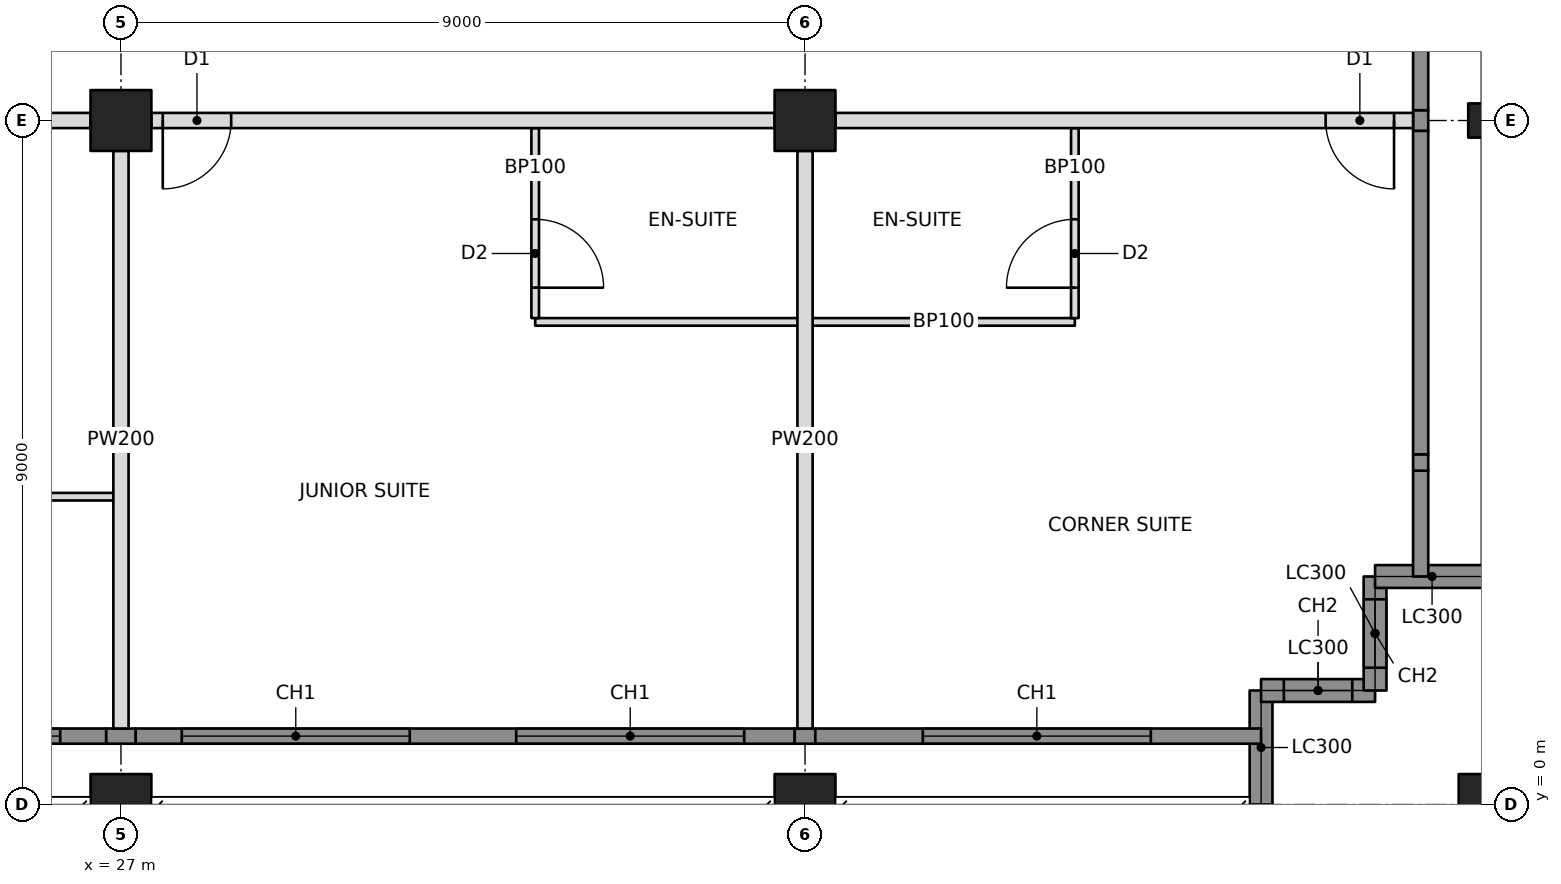
"""IFC4 building model, lengths in metres.
Left out: names, types, materials, properties, quantities, classifications, styles, units other than length and angle.
Written with IfcOpenShell. Run it as: python <this file> out.ifc"""

import sys

from ifc_helpers import new_model, si_unit, direction, frame, frame_2d, origin, origin_2d, place, context, subcontext, project, spatial, rectangle, hollow_rectangle, i_section, extrude, element, fill, save


model = new_model("IFC4")
c1 = context("Model", 3, precision=1e-05, world=origin(), true_north=direction((0.0, 1.0)))
c2 = subcontext(c1, "Body", "Model", "MODEL_VIEW")
j1 = project(units=[si_unit("LENGTHUNIT", "METRE"), si_unit("PLANEANGLEUNIT", "RADIAN")], contexts=[c1])
p1 = place(None, origin())
s1 = spatial("IfcSite", under=j1, at=p1, CompositionType="ELEMENT")
p2 = place(p1, origin())
s2 = spatial("IfcBuilding", under=s1, at=p2, CompositionType="ELEMENT")
p3 = place(p2, frame((0.0, 0.0, 187.6)))
s3 = spatial("IfcBuildingStorey", under=s2, at=p3, CompositionType="ELEMENT", Elevation=187.6)
p4 = place(p3, frame((27.0, 0.0, 0.0), z_axis=(0.0, 0.0, 1.0), x_axis=(1.0, 0.0, 0.0)))
e1 = element("IfcColumn", 1, at=p4, inside=s3, PredefinedType="COLUMN", context=c2, shape_type="SweptSolid", body=[
    extrude(hollow_rectangle(XDim=0.8, YDim=0.8, WallThickness=0.07, at=origin_2d()), origin(), (0.0, 0.0, 1.0), 3.4),
])
p5 = place(p3, frame((27.0, 9.0, 0.0), z_axis=(0.0, 0.0, 1.0), x_axis=(1.0, 0.0, 0.0)))
e2 = element("IfcColumn", 2, at=p5, inside=s3, PredefinedType="COLUMN", context=c2, shape_type="SweptSolid", body=[
    extrude(hollow_rectangle(XDim=0.8, YDim=0.8, WallThickness=0.06, at=origin_2d()), origin(), (0.0, 0.0, 1.0), 3.4),
])
p6 = place(p3, frame((36.0, 0.0, 0.0), z_axis=(0.0, 0.0, 1.0), x_axis=(1.0, 0.0, 0.0)))
e3 = element("IfcColumn", 3, at=p6, inside=s3, PredefinedType="COLUMN", context=c2, shape_type="SweptSolid", body=[
    extrude(hollow_rectangle(XDim=0.8, YDim=0.8, WallThickness=0.07, at=origin_2d()), origin(), (0.0, 0.0, 1.0), 3.4),
])
p7 = place(p3, frame((36.0, 9.0, 0.0), z_axis=(0.0, 0.0, 1.0), x_axis=(0.0, 1.0, 0.0)))
e4 = element("IfcColumn", 4, at=p7, inside=s3, PredefinedType="COLUMN", context=c2, shape_type="SweptSolid", body=[
    extrude(hollow_rectangle(XDim=0.8, YDim=0.8, WallThickness=0.06, at=origin_2d()), origin(), (0.0, 0.0, 1.0), 3.4),
])
p8 = place(p3, frame((45.0, 0.0, 0.0), z_axis=(0.0, 0.0, 1.0), x_axis=(1.0, 0.0, 0.0)))
e5 = element("IfcColumn", 5, at=p8, inside=s3, PredefinedType="COLUMN", context=c2, shape_type="SweptSolid", body=[
    extrude(hollow_rectangle(XDim=0.8, YDim=0.8, WallThickness=0.07, at=origin_2d()), origin(), (0.0, 0.0, 1.0), 3.4),
])
p9 = place(p3, frame((45.0, 9.0, 0.0), z_axis=(0.0, 0.0, 1.0), x_axis=(0.0, 1.0, 0.0)))
e6 = element("IfcColumn", 6, at=p9, inside=s3, PredefinedType="COLUMN", context=c2, shape_type="SweptSolid", body=[
    extrude(i_section(OverallWidth=0.449, OverallDepth=0.549, WebThickness=0.072, FlangeThickness=0.115, at=origin_2d()), origin(), (0.0, 0.0, 1.0), 3.4),
])
p10 = place(p3, frame((42.0, 0.0, 0.0), z_axis=(0.0, 0.0, 1.0), x_axis=(0.0, 1.0, 0.0)))
e7 = element("IfcWall", 7, at=p10, inside=s3, PredefinedType="SOLIDWALL", context=c2, shape_type="SweptSolid", body=[
    extrude(rectangle(XDim=1.5, YDim=0.3, at=frame_2d((0.75, 0.0))), origin(), (0.0, 0.0, 1.0), 2.42),
])
p11 = place(p3, frame((42.0, 1.5, 0.0), z_axis=(0.0, 0.0, 1.0), x_axis=(1.0, 0.0, 0.0)))
e8 = element("IfcWall", 8, at=p11, inside=s3, PredefinedType="SOLIDWALL", context=c2, shape_type="SweptSolid", body=[
    extrude(rectangle(XDim=1.5, YDim=0.3, at=frame_2d((0.75, 0.0))), origin(), (0.0, 0.0, 1.0), 3.2),
])
p12 = place(p11, frame((0.3, 0.0, 0.6)))
e9 = element("IfcOpeningElement", 9, at=p12, cuts=e8, PredefinedType="OPENING", context=c2, shape_type="SweptSolid", body=[
    extrude(rectangle(XDim=0.9, YDim=2.2, at=frame_2d((0.45, 1.1))), frame((0.0, 0.16, 0.0), z_axis=(0.0, -1.0, 0.0), x_axis=(1.0, 0.0, 0.0)), (0.0, 0.0, 1.0), 0.32),
])
p13 = place(p3, frame((43.5, 1.5, 0.0), z_axis=(0.0, 0.0, 1.0), x_axis=(0.0, 1.0, 0.0)))
e10 = element("IfcWall", 10, at=p13, inside=s3, PredefinedType="SOLIDWALL", context=c2, shape_type="SweptSolid", body=[
    extrude(rectangle(XDim=1.5, YDim=0.3, at=frame_2d((0.75, 0.0))), origin(), (0.0, 0.0, 1.0), 3.2),
])
p14 = place(p13, frame((0.3, 0.0, 0.6)))
e11 = element("IfcOpeningElement", 11, at=p14, cuts=e10, PredefinedType="OPENING", context=c2, shape_type="SweptSolid", body=[
    extrude(rectangle(XDim=0.9, YDim=2.2, at=frame_2d((0.45, 1.1))), frame((0.0, 0.16, 0.0), z_axis=(0.0, -1.0, 0.0), x_axis=(1.0, 0.0, 0.0)), (0.0, 0.0, 1.0), 0.32),
])
p15 = place(p3, frame((43.5, 3.0, 0.0), z_axis=(0.0, 0.0, 1.0), x_axis=(1.0, 0.0, 0.0)))
e12 = element("IfcWall", 12, at=p15, inside=s3, PredefinedType="SOLIDWALL", context=c2, shape_type="SweptSolid", body=[
    extrude(rectangle(XDim=1.5, YDim=0.3, at=frame_2d((0.75, 0.0))), origin(), (0.0, 0.0, 1.0), 2.42),
])
p16 = place(p3, frame((44.1, 3.0, 0.0), z_axis=(0.0, 0.0, 1.0), x_axis=(0.0, 1.0, 0.0)))
e13 = element("IfcWall", 13, at=p16, inside=s3, PredefinedType="SOLIDWALL", context=c2, shape_type="SweptSolid", body=[
    extrude(rectangle(XDim=1.393, YDim=0.2, at=frame_2d((0.696, 0.0))), origin(), (0.0, 0.0, 1.0), 3.2),
])
p17 = place(p3, frame((18.4, 9.0, 0.0), z_axis=(0.0, 0.0, 1.0), x_axis=(1.0, 0.0, 0.0)))
e14 = element("IfcWall", 14, at=p17, inside=s3, PredefinedType="PARTITIONING", context=c2, shape_type="SweptSolid", body=[
    extrude(rectangle(XDim=8.2, YDim=0.2, at=frame_2d((4.1, 0.0))), origin(), (0.0, 0.0, 1.0), 2.405),
])
p18 = place(p17, frame((0.15, 0.0, 0.0)))
e15 = element("IfcOpeningElement", 15, at=p18, cuts=e14, PredefinedType="OPENING", context=c2, shape_type="SweptSolid", body=[
    extrude(rectangle(XDim=0.9, YDim=2.1, at=frame_2d((0.45, 1.05))), frame((0.0, 0.11, 0.0), z_axis=(0.0, -1.0, 0.0), x_axis=(1.0, 0.0, 0.0)), (0.0, 0.0, 1.0), 0.22),
])
p19 = place(p3, frame((27.4, 9.0, 0.0), z_axis=(0.0, 0.0, 1.0), x_axis=(1.0, 0.0, 0.0)))
e16 = element("IfcWall", 16, at=p19, inside=s3, PredefinedType="PARTITIONING", context=c2, shape_type="SweptSolid", body=[
    extrude(rectangle(XDim=8.2, YDim=0.2, at=frame_2d((4.1, 0.0))), origin(), (0.0, 0.0, 1.0), 2.405),
])
p20 = place(p19, frame((0.15, 0.0, 0.0)))
e17 = element("IfcOpeningElement", 17, at=p20, cuts=e16, PredefinedType="OPENING", context=c2, shape_type="SweptSolid", body=[
    extrude(rectangle(XDim=0.9, YDim=2.1, at=frame_2d((0.45, 1.05))), frame((0.0, 0.11, 0.0), z_axis=(0.0, -1.0, 0.0), x_axis=(1.0, 0.0, 0.0)), (0.0, 0.0, 1.0), 0.22),
])
p21 = place(p3, frame((36.4, 9.0, 0.0), z_axis=(0.0, 0.0, 1.0), x_axis=(1.0, 0.0, 0.0)))
e18 = element("IfcWall", 18, at=p21, inside=s3, PredefinedType="PARTITIONING", context=c2, shape_type="SweptSolid", body=[
    extrude(rectangle(XDim=7.6, YDim=0.2, at=frame_2d((3.8, 0.0))), origin(), (0.0, 0.0, 1.0), 2.438),
])
p22 = place(p21, frame((6.45, 0.0, 0.0)))
e19 = element("IfcOpeningElement", 19, at=p22, cuts=e18, PredefinedType="OPENING", context=c2, shape_type="SweptSolid", body=[
    extrude(rectangle(XDim=0.9, YDim=2.1, at=frame_2d((0.45, 1.05))), frame((0.0, 0.11, 0.0), z_axis=(0.0, -1.0, 0.0), x_axis=(1.0, 0.0, 0.0)), (0.0, 0.0, 1.0), 0.22),
])
p23 = place(p3, frame((27.0, 8.6, 0.0), z_axis=(0.0, 0.0, 1.0), x_axis=(0.0, -1.0, 0.0)))
e20 = element("IfcWall", 20, at=p23, inside=s3, PredefinedType="PARTITIONING", context=c2, shape_type="SweptSolid", body=[
    extrude(rectangle(XDim=7.6, YDim=0.2, at=frame_2d((3.8, 0.0))), origin(), (0.0, 0.0, 1.0), 2.405),
])
p24 = place(p3, frame((36.0, 8.6, 0.0), z_axis=(0.0, 0.0, 1.0), x_axis=(0.0, -1.0, 0.0)))
e21 = element("IfcWall", 21, at=p24, inside=s3, PredefinedType="PARTITIONING", context=c2, shape_type="SweptSolid", body=[
    extrude(rectangle(XDim=7.6, YDim=0.2, at=frame_2d((3.8, 0.0))), origin(), (0.0, 0.0, 1.0), 2.438),
])
p25 = place(p3, frame((22.5, 4.05, 0.0), z_axis=(0.0, 0.0, 1.0), x_axis=(1.0, 0.0, 0.0)))
e22 = element("IfcWall", 22, at=p25, inside=s3, PredefinedType="PARTITIONING", context=c2, shape_type="SweptSolid", body=[
    extrude(rectangle(XDim=4.4, YDim=0.1, at=frame_2d((2.2, 0.0))), origin(), (0.0, 0.0, 1.0), 2.404),
])
p26 = place(p25, frame((0.5, 0.0, 0.0)))
e23 = element("IfcOpeningElement", 23, at=p26, cuts=e22, PredefinedType="OPENING", context=c2, shape_type="SweptSolid", body=[
    extrude(rectangle(XDim=0.9, YDim=2.1, at=frame_2d((0.45, 1.05))), frame((0.0, 0.06, 0.0), z_axis=(0.0, -1.0, 0.0), x_axis=(1.0, 0.0, 0.0)), (0.0, 0.0, 1.0), 0.12),
])
p27 = place(p3, frame((32.45, 6.35, 0.0), z_axis=(0.0, 0.0, 1.0), x_axis=(1.0, 0.0, 0.0)))
e24 = element("IfcWall", 24, at=p27, inside=s3, PredefinedType="PARTITIONING", context=c2, shape_type="SweptSolid", body=[
    extrude(rectangle(XDim=3.45, YDim=0.1, at=frame_2d((1.725, 0.0))), origin(), (0.0, 0.0, 1.0), 2.438),
])
p28 = place(p3, frame((32.45, 8.9, 0.0), z_axis=(0.0, 0.0, 1.0), x_axis=(0.0, -1.0, 0.0)))
e25 = element("IfcWall", 25, at=p28, inside=s3, PredefinedType="PARTITIONING", context=c2, shape_type="SweptSolid", body=[
    extrude(rectangle(XDim=2.5, YDim=0.1, at=frame_2d((1.25, 0.0))), origin(), (0.0, 0.0, 1.0), 2.404),
])
p29 = place(p28, frame((1.2, 0.0, 0.0)))
e26 = element("IfcOpeningElement", 26, at=p29, cuts=e25, PredefinedType="OPENING", context=c2, shape_type="SweptSolid", body=[
    extrude(rectangle(XDim=0.9, YDim=2.1, at=frame_2d((0.45, 1.05))), frame((0.0, 0.06, 0.0), z_axis=(0.0, -1.0, 0.0), x_axis=(1.0, 0.0, 0.0)), (0.0, 0.0, 1.0), 0.12),
])
p30 = place(p3, frame((36.1, 6.35, 0.0), z_axis=(0.0, 0.0, 1.0), x_axis=(1.0, 0.0, 0.0)))
e27 = element("IfcWall", 27, at=p30, inside=s3, PredefinedType="PARTITIONING", context=c2, shape_type="SweptSolid", body=[
    extrude(rectangle(XDim=3.45, YDim=0.1, at=frame_2d((1.725, 0.0))), origin(), (0.0, 0.0, 1.0), 2.438),
])
p31 = place(p3, frame((39.55, 8.9, 0.0), z_axis=(0.0, 0.0, 1.0), x_axis=(0.0, -1.0, 0.0)))
e28 = element("IfcWall", 28, at=p31, inside=s3, PredefinedType="PARTITIONING", context=c2, shape_type="SweptSolid", body=[
    extrude(rectangle(XDim=2.5, YDim=0.1, at=frame_2d((1.25, 0.0))), origin(), (0.0, 0.0, 1.0), 2.438),
])
p32 = place(p31, frame((1.2, 0.0, 0.0)))
e29 = element("IfcOpeningElement", 29, at=p32, cuts=e28, PredefinedType="OPENING", context=c2, shape_type="SweptSolid", body=[
    extrude(rectangle(XDim=0.9, YDim=2.1, at=frame_2d((0.45, 1.05))), frame((0.0, 0.06, 0.0), z_axis=(0.0, -1.0, 0.0), x_axis=(1.0, 0.0, 0.0)), (0.0, 0.0, 1.0), 0.12),
])
p33 = place(p3, frame((18.194, 0.9, 0.0), z_axis=(0.0, 0.0, 1.0), x_axis=(1.0, 0.0, 0.0)))
e30 = element("IfcWall", 30, at=p33, inside=s3, PredefinedType="SOLIDWALL", context=c2, shape_type="SweptSolid", body=[
    extrude(rectangle(XDim=8.612, YDim=0.2, at=frame_2d((4.306, 0.0))), origin(), (0.0, 0.0, 1.0), 3.2),
])
p34 = place(p33, frame((0.606, 0.0, 0.6)))
e31 = element("IfcOpeningElement", 31, at=p34, cuts=e30, PredefinedType="OPENING", context=c2, shape_type="SweptSolid", body=[
    extrude(rectangle(XDim=3.0, YDim=2.2, at=frame_2d((1.5, 1.1))), frame((0.0, 0.11, 0.0), z_axis=(0.0, -1.0, 0.0), x_axis=(1.0, 0.0, 0.0)), (0.0, 0.0, 1.0), 0.22),
])
p35 = place(p33, frame((5.006, 0.0, 0.6)))
e32 = element("IfcOpeningElement", 32, at=p35, cuts=e30, PredefinedType="OPENING", context=c2, shape_type="SweptSolid", body=[
    extrude(rectangle(XDim=3.0, YDim=2.2, at=frame_2d((1.5, 1.1))), frame((0.0, 0.11, 0.0), z_axis=(0.0, -1.0, 0.0), x_axis=(1.0, 0.0, 0.0)), (0.0, 0.0, 1.0), 0.22),
])
p36 = place(p3, frame((26.806, 0.9, 0.0), z_axis=(0.0, 0.0, 1.0), x_axis=(1.0, 0.0, 0.0)))
e33 = element("IfcWall", 33, at=p36, inside=s3, PredefinedType="SOLIDWALL", context=c2, shape_type="SweptSolid", body=[
    extrude(rectangle(XDim=0.388, YDim=0.2, at=frame_2d((0.194, 0.0))), origin(), (0.0, 0.0, 1.0), 2.404),
])
p37 = place(p3, frame((27.194, 0.9, 0.0), z_axis=(0.0, 0.0, 1.0), x_axis=(1.0, 0.0, 0.0)))
e34 = element("IfcWall", 34, at=p37, inside=s3, PredefinedType="SOLIDWALL", context=c2, shape_type="SweptSolid", body=[
    extrude(rectangle(XDim=8.671, YDim=0.2, at=frame_2d((4.335, 0.0))), origin(), (0.0, 0.0, 1.0), 3.2),
])
p38 = place(p37, frame((0.606, 0.0, 0.6)))
e35 = element("IfcOpeningElement", 35, at=p38, cuts=e34, PredefinedType="OPENING", context=c2, shape_type="SweptSolid", body=[
    extrude(rectangle(XDim=3.0, YDim=2.2, at=frame_2d((1.5, 1.1))), frame((0.0, 0.11, 0.0), z_axis=(0.0, -1.0, 0.0), x_axis=(1.0, 0.0, 0.0)), (0.0, 0.0, 1.0), 0.22),
])
p39 = place(p37, frame((5.006, 0.0, 0.6)))
e36 = element("IfcOpeningElement", 36, at=p39, cuts=e34, PredefinedType="OPENING", context=c2, shape_type="SweptSolid", body=[
    extrude(rectangle(XDim=3.0, YDim=2.2, at=frame_2d((1.5, 1.1))), frame((0.0, 0.11, 0.0), z_axis=(0.0, -1.0, 0.0), x_axis=(1.0, 0.0, 0.0)), (0.0, 0.0, 1.0), 0.22),
])
p40 = place(p3, frame((35.865, 0.9, 0.0), z_axis=(0.0, 0.0, 1.0), x_axis=(1.0, 0.0, 0.0)))
e37 = element("IfcWall", 37, at=p40, inside=s3, PredefinedType="SOLIDWALL", context=c2, shape_type="SweptSolid", body=[
    extrude(rectangle(XDim=0.271, YDim=0.2, at=frame_2d((0.135, 0.0))), origin(), (0.0, 0.0, 1.0), 2.438),
])
p41 = place(p3, frame((36.135, 0.9, 0.0), z_axis=(0.0, 0.0, 1.0), x_axis=(1.0, 0.0, 0.0)))
e38 = element("IfcWall", 38, at=p41, inside=s3, PredefinedType="SOLIDWALL", context=c2, shape_type="SweptSolid", body=[
    extrude(rectangle(XDim=5.865, YDim=0.2, at=frame_2d((2.932, 0.0))), origin(), (0.0, 0.0, 1.0), 3.2),
])
p42 = place(p41, frame((1.415, 0.0, 0.6)))
e39 = element("IfcOpeningElement", 39, at=p42, cuts=e38, PredefinedType="OPENING", context=c2, shape_type="SweptSolid", body=[
    extrude(rectangle(XDim=3.0, YDim=2.2, at=frame_2d((1.5, 1.1))), frame((0.0, 0.11, 0.0), z_axis=(0.0, -1.0, 0.0), x_axis=(1.0, 0.0, 0.0)), (0.0, 0.0, 1.0), 0.22),
])
p43 = place(p3, frame((44.1, 4.393, 0.0), z_axis=(0.0, 0.0, 1.0), x_axis=(0.0, 1.0, 0.0)))
e40 = element("IfcWall", 40, at=p43, inside=s3, PredefinedType="SOLIDWALL", context=c2, shape_type="SweptSolid", body=[
    extrude(rectangle(XDim=0.215, YDim=0.2, at=frame_2d((0.107, 0.0))), origin(), (0.0, 0.0, 1.0), 2.661),
])
p44 = place(p3, frame((44.1, 4.607, 0.0), z_axis=(0.0, 0.0, 1.0), x_axis=(0.0, 1.0, 0.0)))
e41 = element("IfcWall", 41, at=p44, inside=s3, PredefinedType="SOLIDWALL", context=c2, shape_type="SweptSolid", body=[
    extrude(rectangle(XDim=4.257, YDim=0.2, at=frame_2d((2.129, 0.0))), origin(), (0.0, 0.0, 1.0), 3.2),
])
p45 = place(p3, frame((44.1, 8.865, 0.0), z_axis=(0.0, 0.0, 1.0), x_axis=(0.0, 1.0, 0.0)))
e42 = element("IfcWall", 42, at=p45, inside=s3, PredefinedType="SOLIDWALL", context=c2, shape_type="SweptSolid", body=[
    extrude(rectangle(XDim=0.271, YDim=0.2, at=frame_2d((0.135, 0.0))), origin(), (0.0, 0.0, 1.0), 2.438),
])
p46 = place(p3, frame((44.1, 9.135, 0.0), z_axis=(0.0, 0.0, 1.0), x_axis=(0.0, 1.0, 0.0)))
e43 = element("IfcWall", 43, at=p46, inside=s3, PredefinedType="SOLIDWALL", context=c2, shape_type="SweptSolid", body=[
    extrude(rectangle(XDim=8.671, YDim=0.2, at=frame_2d((4.335, 0.0))), origin(), (0.0, 0.0, 1.0), 3.2),
])
p47 = place(p46, frame((2.015, 0.0, 0.6)))
e44 = element("IfcOpeningElement", 44, at=p47, cuts=e43, PredefinedType="OPENING", context=c2, shape_type="SweptSolid", body=[
    extrude(rectangle(XDim=3.0, YDim=2.2, at=frame_2d((1.5, 1.1))), frame((0.0, 0.11, 0.0), z_axis=(0.0, -1.0, 0.0), x_axis=(1.0, 0.0, 0.0)), (0.0, 0.0, 1.0), 0.22),
])
p48 = place(p46, frame((5.515, 0.0, 0.6)))
e45 = element("IfcOpeningElement", 45, at=p48, cuts=e43, PredefinedType="OPENING", context=c2, shape_type="SweptSolid", body=[
    extrude(rectangle(XDim=3.0, YDim=2.2, at=frame_2d((1.5, 1.1))), frame((0.0, 0.11, 0.0), z_axis=(0.0, -1.0, 0.0), x_axis=(1.0, 0.0, 0.0)), (0.0, 0.0, 1.0), 0.22),
])
p49 = place(p12, origin())
e46 = element("IfcWindow", 46, at=p49, inside=s3, PartitioningType="SINGLE_PANEL", PredefinedType="WINDOW", context=c2, shape_type="SweptSolid", body=[
    extrude(rectangle(XDim=0.9, YDim=2.2, at=frame_2d((0.45, 1.1))), frame((0.0, 0.03, 0.0), z_axis=(0.0, -1.0, 0.0), x_axis=(1.0, 0.0, 0.0)), (0.0, 0.0, 1.0), 0.06),
])
fill(e9, e46)
p50 = place(p14, origin())
e47 = element("IfcWindow", 47, at=p50, inside=s3, PartitioningType="SINGLE_PANEL", PredefinedType="WINDOW", context=c2, shape_type="SweptSolid", body=[
    extrude(rectangle(XDim=0.9, YDim=2.2, at=frame_2d((0.45, 1.1))), frame((0.0, 0.03, 0.0), z_axis=(0.0, -1.0, 0.0), x_axis=(1.0, 0.0, 0.0)), (0.0, 0.0, 1.0), 0.06),
])
fill(e11, e47)
p51 = place(p35, origin())
e48 = element("IfcWindow", 48, at=p51, inside=s3, PartitioningType="TRIPLE_PANEL_VERTICAL", PredefinedType="WINDOW", context=c2, shape_type="SweptSolid", body=[
    extrude(rectangle(XDim=3.0, YDim=2.2, at=frame_2d((1.5, 1.1))), frame((0.0, 0.03, 0.0), z_axis=(0.0, -1.0, 0.0), x_axis=(1.0, 0.0, 0.0)), (0.0, 0.0, 1.0), 0.06),
])
fill(e32, e48)
p52 = place(p38, origin())
e49 = element("IfcWindow", 49, at=p52, inside=s3, PartitioningType="TRIPLE_PANEL_VERTICAL", PredefinedType="WINDOW", context=c2, shape_type="SweptSolid", body=[
    extrude(rectangle(XDim=3.0, YDim=2.2, at=frame_2d((1.5, 1.1))), frame((0.0, 0.03, 0.0), z_axis=(0.0, -1.0, 0.0), x_axis=(1.0, 0.0, 0.0)), (0.0, 0.0, 1.0), 0.06),
])
fill(e35, e49)
p53 = place(p39, origin())
e50 = element("IfcWindow", 50, at=p53, inside=s3, PartitioningType="TRIPLE_PANEL_VERTICAL", PredefinedType="WINDOW", context=c2, shape_type="SweptSolid", body=[
    extrude(rectangle(XDim=3.0, YDim=2.2, at=frame_2d((1.5, 1.1))), frame((0.0, 0.03, 0.0), z_axis=(0.0, -1.0, 0.0), x_axis=(1.0, 0.0, 0.0)), (0.0, 0.0, 1.0), 0.06),
])
fill(e36, e50)
p54 = place(p42, origin())
e51 = element("IfcWindow", 51, at=p54, inside=s3, PartitioningType="TRIPLE_PANEL_VERTICAL", PredefinedType="WINDOW", context=c2, shape_type="SweptSolid", body=[
    extrude(rectangle(XDim=3.0, YDim=2.2, at=frame_2d((1.5, 1.1))), frame((0.0, 0.03, 0.0), z_axis=(0.0, -1.0, 0.0), x_axis=(1.0, 0.0, 0.0)), (0.0, 0.0, 1.0), 0.06),
])
fill(e39, e51)
p55 = place(p29, origin())
e52 = element("IfcDoor", 52, at=p55, inside=s3, OperationType="SINGLE_SWING_RIGHT", PredefinedType="DOOR", context=c2, shape_type="SweptSolid", body=[
    extrude(rectangle(XDim=0.9, YDim=2.1, at=frame_2d((0.45, 1.05))), frame((0.0, 0.025, 0.0), z_axis=(0.0, -1.0, 0.0), x_axis=(1.0, 0.0, 0.0)), (0.0, 0.0, 1.0), 0.05),
])
fill(e26, e52)
p56 = place(p20, frame((0.9, 0.0, 0.0), z_axis=(0.0, 0.0, 1.0), x_axis=(-1.0, 0.0, 0.0)))
e53 = element("IfcDoor", 53, at=p56, inside=s3, OperationType="SINGLE_SWING_RIGHT", PredefinedType="DOOR", context=c2, shape_type="SweptSolid", body=[
    extrude(rectangle(XDim=0.9, YDim=2.1, at=frame_2d((0.45, 1.05))), frame((0.0, 0.025, 0.0), z_axis=(0.0, -1.0, 0.0), x_axis=(1.0, 0.0, 0.0)), (0.0, 0.0, 1.0), 0.05),
])
fill(e17, e53)
p57 = place(p32, frame((0.9, 0.0, 0.0), z_axis=(0.0, 0.0, 1.0), x_axis=(-1.0, 0.0, 0.0)))
e54 = element("IfcDoor", 54, at=p57, inside=s3, OperationType="SINGLE_SWING_LEFT", PredefinedType="DOOR", context=c2, shape_type="SweptSolid", body=[
    extrude(rectangle(XDim=0.9, YDim=2.1, at=frame_2d((0.45, 1.05))), frame((0.0, 0.025, 0.0), z_axis=(0.0, -1.0, 0.0), x_axis=(1.0, 0.0, 0.0)), (0.0, 0.0, 1.0), 0.05),
])
fill(e29, e54)
p58 = place(p22, frame((0.9, 0.0, 0.0), z_axis=(0.0, 0.0, 1.0), x_axis=(-1.0, 0.0, 0.0)))
e55 = element("IfcDoor", 55, at=p58, inside=s3, OperationType="SINGLE_SWING_LEFT", PredefinedType="DOOR", context=c2, shape_type="SweptSolid", body=[
    extrude(rectangle(XDim=0.9, YDim=2.1, at=frame_2d((0.45, 1.05))), frame((0.0, 0.025, 0.0), z_axis=(0.0, -1.0, 0.0), x_axis=(1.0, 0.0, 0.0)), (0.0, 0.0, 1.0), 0.05),
])
fill(e19, e55)
save(model, sys.argv[1])
